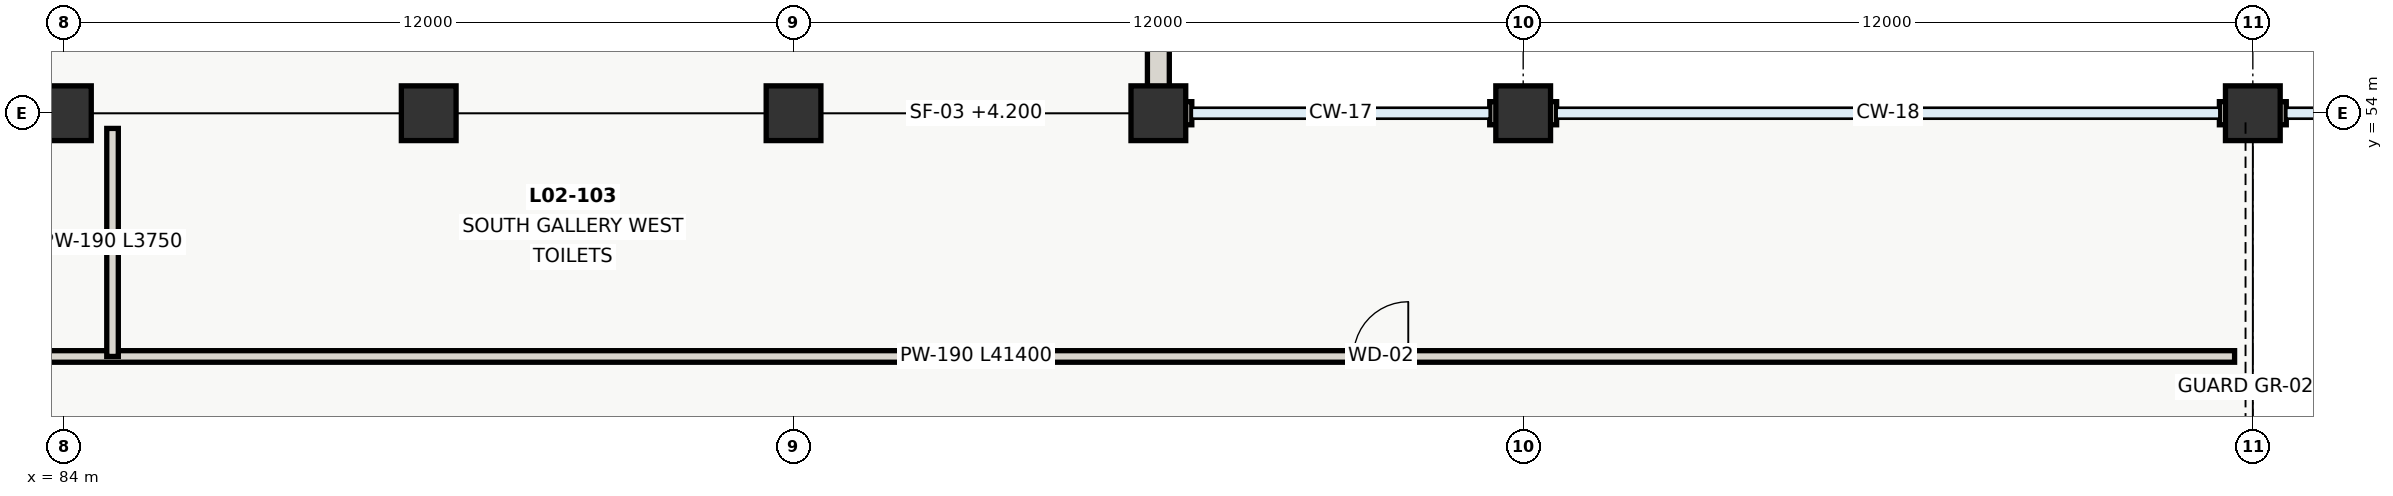
"""IFC4 building model, lengths in metres.
Left out: names, types, materials, properties, quantities, classifications, styles, units other than length and angle.
Written with IfcOpenShell. Run it as: python <this file> out.ifc"""

import sys

from ifc_helpers import new_model, si_unit, direction, frame, frame_2d, origin, origin_2d, place, context, subcontext, project, spatial, rectangle, extrude, element, fill, save


model = new_model("IFC4")
c1 = context("Model", 3, precision=1e-05, world=origin(), true_north=direction((0.0, 1.0)))
c2 = subcontext(c1, "Body", "Model", "MODEL_VIEW")
j1 = project(units=[si_unit("LENGTHUNIT", "METRE"), si_unit("PLANEANGLEUNIT", "RADIAN")], contexts=[c1])
p1 = place(None, origin())
s1 = spatial("IfcSite", under=j1, at=p1, CompositionType="ELEMENT")
p2 = place(p1, origin())
s2 = spatial("IfcBuilding", under=s1, at=p2, CompositionType="ELEMENT")
p3 = place(p2, frame((0.0, 0.0, 4.2)))
s3 = spatial("IfcBuildingStorey", under=s2, at=p3, CompositionType="ELEMENT", Elevation=4.2)
for number, where, z_axis, x_axis in (
    (1, (84.0, 54.0, 0.0), (0.0, 0.0, 1.0), (1.0, 0.0, 0.0)),
    (2, (90.0, 54.0, 0.0), (0.0, 0.0, 1.0), (1.0, 0.0, 0.0)),
    (3, (96.0, 54.0, 0.0), (0.0, 0.0, 1.0), (1.0, 0.0, 0.0)),
    (4, (102.0, 54.0, 0.0), (0.0, 0.0, 1.0), (1.0, 0.0, 0.0)),
    (5, (108.0, 54.0, 0.0), (0.0, 0.0, 1.0), (1.0, 0.0, 0.0)),
    (6, (120.0, 54.0, 0.0), (0.0, 0.0, 1.0), (1.0, 0.0, 0.0)),
):
    element("IfcColumn", number, at=place(p3, frame(where, z_axis=z_axis, x_axis=x_axis)), inside=s3, PredefinedType="COLUMN", context=c2, shape_type="SweptSolid", body=[
        extrude(rectangle(XDim=0.9, YDim=0.9, at=origin_2d()), origin(), (0.0, 0.0, 1.0), 4.2),
    ])
p4 = place(p3, frame((102.182, 54.0, 0.0), z_axis=(0.0, 0.0, 1.0), x_axis=(1.0, 0.0, 0.0)))
e7 = element("IfcWall", 7, at=p4, inside=s3, PredefinedType="SOLIDWALL", context=c2, shape_type="SweptSolid", body=[
    extrude(rectangle(XDim=0.368, YDim=0.38, at=frame_2d((0.184, 0.0))), origin(), (0.0, 0.0, 1.0), 3.56),
])
p5 = place(p3, frame((107.45, 54.0, 0.0), z_axis=(0.0, 0.0, 1.0), x_axis=(1.0, 0.0, 0.0)))
e8 = element("IfcWall", 8, at=p5, inside=s3, PredefinedType="SOLIDWALL", context=c2, shape_type="SweptSolid", body=[
    extrude(rectangle(XDim=0.55, YDim=0.38, at=frame_2d((0.275, 0.0))), origin(), (0.0, 0.0, 1.0), 3.56),
])
p6 = place(p3, frame((108.002, 54.0, 0.0), z_axis=(0.0, 0.0, 1.0), x_axis=(1.0, 0.0, 0.0)))
e9 = element("IfcWall", 9, at=p6, inside=s3, PredefinedType="SOLIDWALL", context=c2, shape_type="SweptSolid", body=[
    extrude(rectangle(XDim=0.548, YDim=0.38, at=frame_2d((0.274, 0.0))), origin(), (0.0, 0.0, 1.0), 3.56),
])
p7 = place(p3, frame((119.45, 54.0, 0.0), z_axis=(0.0, 0.0, 1.0), x_axis=(1.0, 0.0, 0.0)))
e10 = element("IfcWall", 10, at=p7, inside=s3, PredefinedType="SOLIDWALL", context=c2, shape_type="SweptSolid", body=[
    extrude(rectangle(XDim=0.55, YDim=0.38, at=frame_2d((0.275, 0.0))), origin(), (0.0, 0.0, 1.0), 3.56),
])
p8 = place(p3, frame((120.002, 54.0, 0.0), z_axis=(0.0, 0.0, 1.0), x_axis=(1.0, 0.0, 0.0)))
e11 = element("IfcWall", 11, at=p8, inside=s3, PredefinedType="SOLIDWALL", context=c2, shape_type="SweptSolid", body=[
    extrude(rectangle(XDim=0.548, YDim=0.38, at=frame_2d((0.274, 0.0))), origin(), (0.0, 0.0, 1.0), 3.56),
])
p9 = place(p3, frame((102.0, 56.4, 0.0), z_axis=(0.0, 0.0, 1.0), x_axis=(0.0, -1.0, 0.0)))
e12 = element("IfcWall", 12, at=p9, inside=s3, PredefinedType="SOLIDWALL", context=c2, shape_type="SweptSolid", body=[
    extrude(rectangle(XDim=2.4, YDim=0.36, at=frame_2d((1.2, 0.0))), origin(), (0.0, 0.0, 1.0), 3.5),
])
p10 = place(p3, frame((78.3, 50.0, 0.0), z_axis=(0.0, 0.0, 1.0), x_axis=(1.0, 0.0, 0.0)))
e13 = element("IfcWall", 13, at=p10, inside=s3, PredefinedType="PLUMBINGWALL", context=c2, shape_type="SweptSolid", body=[
    extrude(rectangle(XDim=41.4, YDim=0.19, at=frame_2d((20.7, 0.0))), origin(), (0.0, 0.0, 1.0), 3.72),
])
p11 = place(p10, frame((2.6, 0.0, 0.0)))
e14 = element("IfcOpeningElement", 14, at=p11, cuts=e13, PredefinedType="OPENING", context=c2, shape_type="SweptSolid", body=[
    extrude(rectangle(XDim=1.0, YDim=2.1, at=frame_2d((0.5, 1.05))), frame((0.0, 0.105, 0.0), z_axis=(0.0, -1.0, 0.0), x_axis=(1.0, 0.0, 0.0)), (0.0, 0.0, 1.0), 0.21),
])
p12 = place(p10, frame((26.91, 0.0, 0.0)))
e15 = element("IfcOpeningElement", 15, at=p12, cuts=e13, PredefinedType="OPENING", context=c2, shape_type="SweptSolid", body=[
    extrude(rectangle(XDim=0.9, YDim=2.05, at=frame_2d((0.45, 1.025))), frame((0.0, 0.105, 0.0), z_axis=(0.0, -1.0, 0.0), x_axis=(1.0, 0.0, 0.0)), (0.0, 0.0, 1.0), 0.21),
])
p13 = place(p3, frame((84.8, 50.0, 0.0), z_axis=(0.0, 0.0, 1.0), x_axis=(0.0, 1.0, 0.0)))
e16 = element("IfcWall", 16, at=p13, inside=s3, PredefinedType="PLUMBINGWALL", context=c2, shape_type="SweptSolid", body=[
    extrude(rectangle(XDim=3.75, YDim=0.19, at=frame_2d((1.875, 0.0))), origin(), (0.0, 0.0, 1.0), 3.72),
])
p14 = place(p12, origin())
e17 = element("IfcDoor", 17, at=p14, inside=s3, OperationType="SINGLE_SWING_RIGHT", PredefinedType="DOOR", context=c2, shape_type="SweptSolid", body=[
    extrude(rectangle(XDim=0.9, YDim=2.05, at=frame_2d((0.45, 1.025))), frame((0.0, 0.025, 0.0), z_axis=(0.0, -1.0, 0.0), x_axis=(1.0, 0.0, 0.0)), (0.0, 0.0, 1.0), 0.05),
])
fill(e15, e17)
save(model, sys.argv[1])
